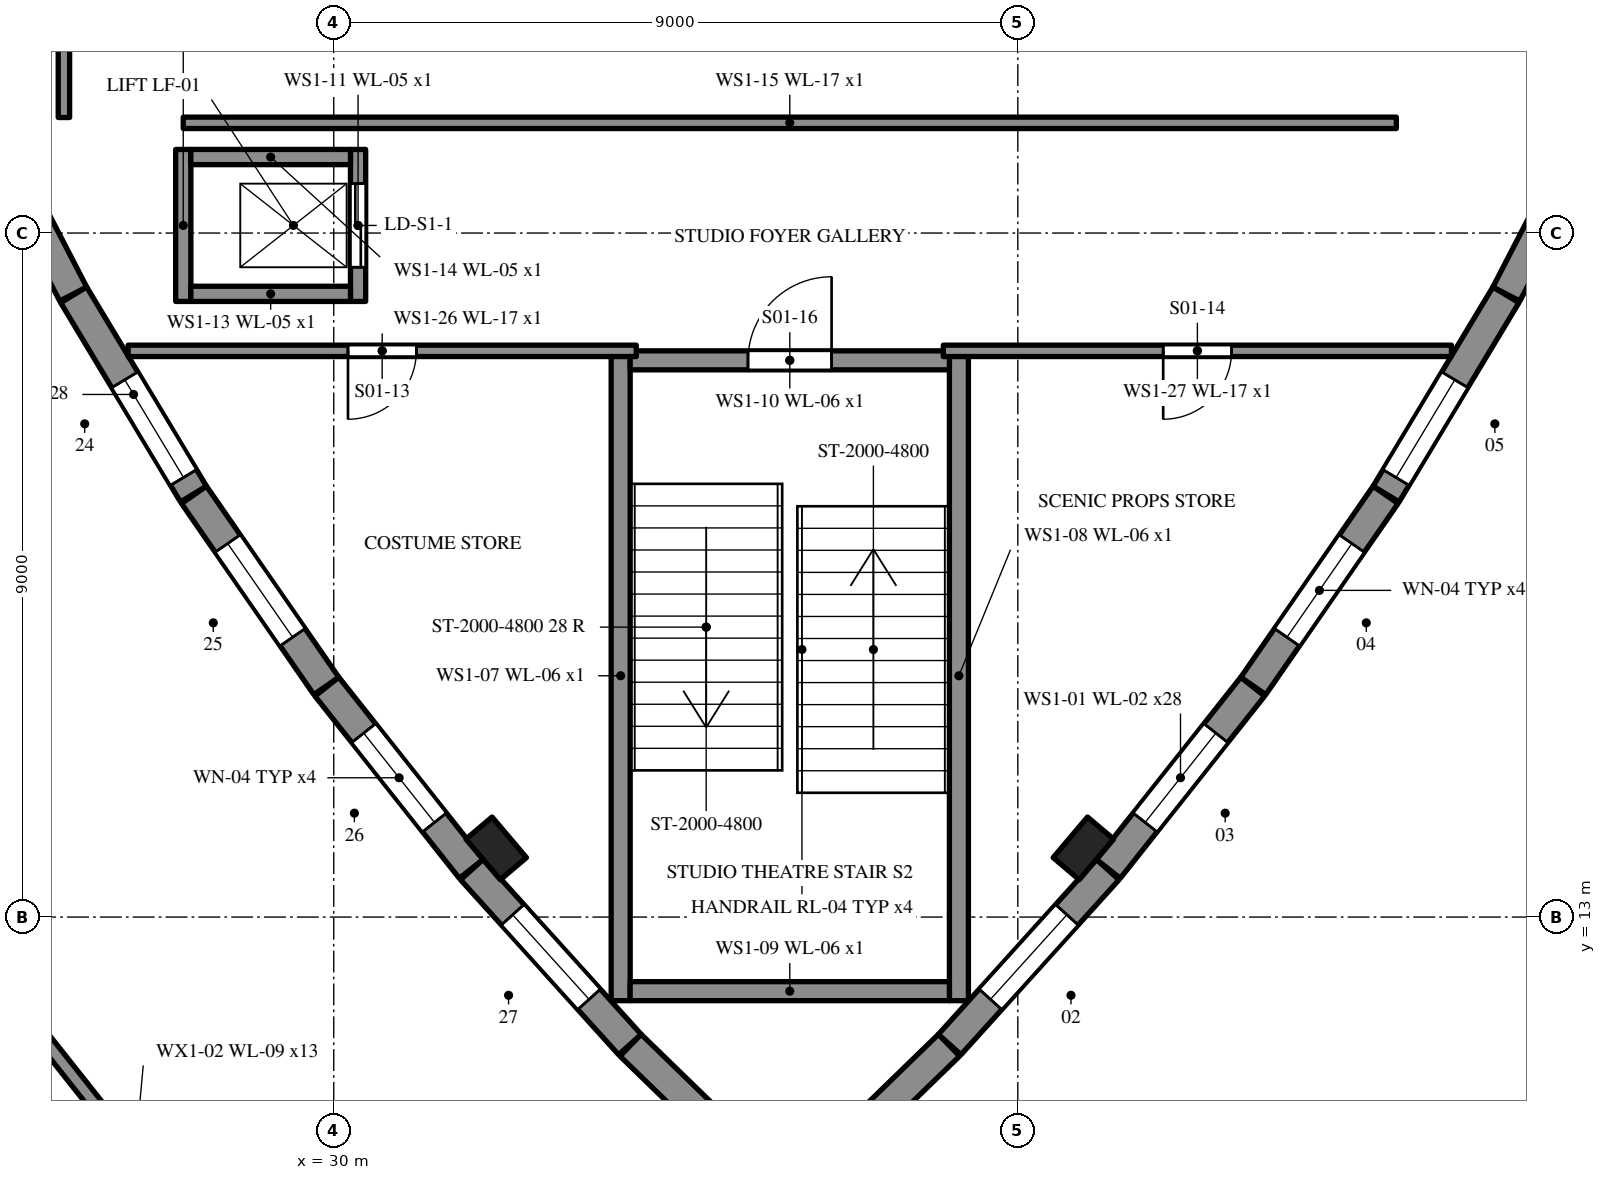
"""IFC4 building model, lengths in metres.
Left out: names, types, materials, properties, quantities, classifications, styles, units other than length and angle.
Written with IfcOpenShell. Run it as: python <this file> out.ifc"""

import sys

from ifc_helpers import new_model, si_unit, direction, frame, frame_2d, origin, origin_2d, place, context, subcontext, project, spatial, rectangle, extrude, element, fill, save


model = new_model("IFC4")
c1 = context("Model", 3, precision=1e-05, world=origin(), true_north=direction((0.0, 1.0)))
c2 = subcontext(c1, "Body", "Model", "MODEL_VIEW")
j1 = project(units=[si_unit("LENGTHUNIT", "METRE"), si_unit("PLANEANGLEUNIT", "RADIAN")], contexts=[c1])
p1 = place(None, origin())
s1 = spatial("IfcSite", under=j1, at=p1, CompositionType="ELEMENT")
p2 = place(p1, origin())
s2 = spatial("IfcBuilding", under=s1, at=p2, CompositionType="ELEMENT")
p3 = place(p2, frame((0.0, 0.0, 5.4)))
s3 = spatial("IfcBuildingStorey", under=s2, at=p3, CompositionType="ELEMENT", Elevation=5.4)
p4 = place(p3, frame((27.271, 10.022, 0.0), z_axis=(0.0, 0.0, 1.0), x_axis=(-0.62097059958, 0.783833856412, 0.0)))
e1 = element("IfcWall", 1, at=p4, inside=s3, PredefinedType="PARAPET", context=c2, shape_type="SweptSolid", body=[
    extrude(rectangle(XDim=3.083, YDim=0.18, at=frame_2d((1.542, 0.0))), origin(), (0.0, 0.0, 1.0), 0.7),
])
p5 = place(p3, frame((36.139, 9.414, 0.0), z_axis=(0.0, 0.0, 1.0), x_axis=(0.717243568607, 0.696822547922, 0.0)))
e2 = element("IfcWall", 2, at=p5, inside=s3, PredefinedType="SOLIDWALL", context=c2, shape_type="SweptSolid", body=[
    extrude(rectangle(XDim=2.726, YDim=0.4, at=frame_2d((1.363, 0.0))), origin(), (0.0, 0.0, 1.0), 4.5),
])
p6 = place(p3, frame((38.104, 11.323, 0.0), z_axis=(0.0, 0.0, 1.0), x_axis=(0.67038553216, 0.742012963681, 0.0)))
e3 = element("IfcWall", 3, at=p6, inside=s3, PredefinedType="SOLIDWALL", context=c2, shape_type="SweptSolid", body=[
    extrude(rectangle(XDim=3.102, YDim=0.4, at=frame_2d((1.551, 0.0))), origin(), (0.0, 0.0, 1.0), 4.5),
])
p7 = place(p6, frame((0.801, 0.0, 2.4)))
e4 = element("IfcOpeningElement", 4, at=p7, cuts=e3, PredefinedType="OPENING", context=c2, shape_type="SweptSolid", body=[
    extrude(rectangle(XDim=1.5, YDim=0.9, at=frame_2d((0.75, 0.45))), frame((0.0, 0.21, 0.0), z_axis=(0.0, -1.0, 0.0), x_axis=(1.0, 0.0, 0.0)), (0.0, 0.0, 1.0), 0.42),
])
p8 = place(p3, frame((40.191, 13.634, 0.0), z_axis=(0.0, 0.0, 1.0), x_axis=(0.620958553355, 0.783843399548, 0.0)))
e5 = element("IfcWall", 5, at=p8, inside=s3, PredefinedType="SOLIDWALL", context=c2, shape_type="SweptSolid", body=[
    extrude(rectangle(XDim=3.058, YDim=0.4, at=frame_2d((1.529, 0.0))), origin(), (0.0, 0.0, 1.0), 4.5),
])
p9 = place(p8, frame((0.779, 0.0, 2.4)))
e6 = element("IfcOpeningElement", 6, at=p9, cuts=e5, PredefinedType="OPENING", context=c2, shape_type="SweptSolid", body=[
    extrude(rectangle(XDim=1.5, YDim=0.9, at=frame_2d((0.75, 0.45))), frame((0.0, 0.21, 0.0), z_axis=(0.0, -1.0, 0.0), x_axis=(1.0, 0.0, 0.0)), (0.0, 0.0, 1.0), 0.42),
])
p10 = place(p3, frame((42.098, 16.042, 0.0), z_axis=(0.0, 0.0, 1.0), x_axis=(0.569371892655, 0.822080073871, 0.0)))
e7 = element("IfcWall", 7, at=p10, inside=s3, PredefinedType="SOLIDWALL", context=c2, shape_type="SweptSolid", body=[
    extrude(rectangle(XDim=3.058, YDim=0.4, at=frame_2d((1.529, 0.0))), origin(), (0.0, 0.0, 1.0), 4.5),
])
p11 = place(p10, frame((0.779, 0.0, 2.4)))
e8 = element("IfcOpeningElement", 8, at=p11, cuts=e7, PredefinedType="OPENING", context=c2, shape_type="SweptSolid", body=[
    extrude(rectangle(XDim=1.5, YDim=0.9, at=frame_2d((0.75, 0.45))), frame((0.0, 0.21, 0.0), z_axis=(0.0, -1.0, 0.0), x_axis=(1.0, 0.0, 0.0)), (0.0, 0.0, 1.0), 0.42),
])
p12 = place(p3, frame((43.846, 18.566, 0.0), z_axis=(0.0, 0.0, 1.0), x_axis=(0.515387841983, 0.856957042293, 0.0)))
e9 = element("IfcWall", 9, at=p12, inside=s3, PredefinedType="SOLIDWALL", context=c2, shape_type="SweptSolid", body=[
    extrude(rectangle(XDim=3.058, YDim=0.4, at=frame_2d((1.529, 0.0))), origin(), (0.0, 0.0, 1.0), 4.5),
])
p13 = place(p12, frame((0.254, 0.0, 2.4)))
e10 = element("IfcOpeningElement", 10, at=p13, cuts=e9, PredefinedType="OPENING", context=c2, shape_type="SweptSolid", body=[
    extrude(rectangle(XDim=1.5, YDim=0.9, at=frame_2d((0.75, 0.45))), frame((0.0, 0.21, 0.0), z_axis=(0.0, -1.0, 0.0), x_axis=(1.0, 0.0, 0.0)), (0.0, 0.0, 1.0), 0.42),
])
for number, where, z_axis, x_axis in (
    (11, (45.428, 21.198, 0.0), (0.0, 0.0, 1.0), (0.459, 0.888, 0.0)),
    (12, (25.167, 23.914, 0.0), (0.0, 0.0, 1.0), (0.459, -0.888, 0.0)),
):
    element("IfcWall", number, at=place(p3, frame(where, z_axis=z_axis, x_axis=x_axis)), inside=s3, PredefinedType="SOLIDWALL", context=c2, shape_type="SweptSolid", body=[
        extrude(rectangle(XDim=3.059, YDim=0.4, at=frame_2d((1.529, 0.0))), origin(), (0.0, 0.0, 1.0), 4.5),
    ])
p14 = place(p3, frame((26.578, 21.186, 0.0), z_axis=(0.0, 0.0, 1.0), x_axis=(0.515387841983, -0.856957042293, 0.0)))
e13 = element("IfcWall", 13, at=p14, inside=s3, PredefinedType="SOLIDWALL", context=c2, shape_type="SweptSolid", body=[
    extrude(rectangle(XDim=3.058, YDim=0.4, at=frame_2d((1.529, 0.0))), origin(), (0.0, 0.0, 1.0), 4.5),
])
p15 = place(p14, frame((1.304, 0.0, 2.4)))
e14 = element("IfcOpeningElement", 14, at=p15, cuts=e13, PredefinedType="OPENING", context=c2, shape_type="SweptSolid", body=[
    extrude(rectangle(XDim=1.5, YDim=0.9, at=frame_2d((0.75, 0.45))), frame((0.0, 0.21, 0.0), z_axis=(0.0, -1.0, 0.0), x_axis=(1.0, 0.0, 0.0)), (0.0, 0.0, 1.0), 0.42),
])
p16 = place(p3, frame((28.161, 18.555, 0.0), z_axis=(0.0, 0.0, 1.0), x_axis=(0.569371892655, -0.822080073871, 0.0)))
e15 = element("IfcWall", 15, at=p16, inside=s3, PredefinedType="SOLIDWALL", context=c2, shape_type="SweptSolid", body=[
    extrude(rectangle(XDim=3.058, YDim=0.4, at=frame_2d((1.529, 0.0))), origin(), (0.0, 0.0, 1.0), 4.5),
])
p17 = place(p16, frame((0.779, 0.0, 2.4)))
e16 = element("IfcOpeningElement", 16, at=p17, cuts=e15, PredefinedType="OPENING", context=c2, shape_type="SweptSolid", body=[
    extrude(rectangle(XDim=1.5, YDim=0.9, at=frame_2d((0.75, 0.45))), frame((0.0, 0.21, 0.0), z_axis=(0.0, -1.0, 0.0), x_axis=(1.0, 0.0, 0.0)), (0.0, 0.0, 1.0), 0.42),
])
p18 = place(p3, frame((29.91, 16.031, 0.0), z_axis=(0.0, 0.0, 1.0), x_axis=(0.620958553355, -0.783843399548, 0.0)))
e17 = element("IfcWall", 17, at=p18, inside=s3, PredefinedType="SOLIDWALL", context=c2, shape_type="SweptSolid", body=[
    extrude(rectangle(XDim=3.058, YDim=0.4, at=frame_2d((1.529, 0.0))), origin(), (0.0, 0.0, 1.0), 4.5),
])
p19 = place(p18, frame((0.779, 0.0, 2.4)))
e18 = element("IfcOpeningElement", 18, at=p19, cuts=e17, PredefinedType="OPENING", context=c2, shape_type="SweptSolid", body=[
    extrude(rectangle(XDim=1.5, YDim=0.9, at=frame_2d((0.75, 0.45))), frame((0.0, 0.21, 0.0), z_axis=(0.0, -1.0, 0.0), x_axis=(1.0, 0.0, 0.0)), (0.0, 0.0, 1.0), 0.42),
])
p20 = place(p3, frame((31.817, 13.625, 0.0), z_axis=(0.0, 0.0, 1.0), x_axis=(0.67038553216, -0.742012963681, 0.0)))
e19 = element("IfcWall", 19, at=p20, inside=s3, PredefinedType="SOLIDWALL", context=c2, shape_type="SweptSolid", body=[
    extrude(rectangle(XDim=3.102, YDim=0.4, at=frame_2d((1.551, 0.0))), origin(), (0.0, 0.0, 1.0), 4.5),
])
p21 = place(p20, frame((0.801, 0.0, 2.4)))
e20 = element("IfcOpeningElement", 20, at=p21, cuts=e19, PredefinedType="OPENING", context=c2, shape_type="SweptSolid", body=[
    extrude(rectangle(XDim=1.5, YDim=0.9, at=frame_2d((0.75, 0.45))), frame((0.0, 0.21, 0.0), z_axis=(0.0, -1.0, 0.0), x_axis=(1.0, 0.0, 0.0)), (0.0, 0.0, 1.0), 0.42),
])
p22 = place(p3, frame((33.906, 11.314, 0.0), z_axis=(0.0, 0.0, 1.0), x_axis=(0.717243568607, -0.696822547922, 0.0)))
e21 = element("IfcWall", 21, at=p22, inside=s3, PredefinedType="SOLIDWALL", context=c2, shape_type="SweptSolid", body=[
    extrude(rectangle(XDim=2.726, YDim=0.4, at=frame_2d((1.363, 0.0))), origin(), (0.0, 0.0, 1.0), 4.5),
])
for number, where, z_axis, x_axis in (
    (22, (39.863, 13.904, 0.0), (0.0, 0.0, 1.0), (0.646, 0.763, 0.0)),
    (23, (32.137, 13.904, 0.0), (0.0, 0.0, 1.0), (0.646, -0.763, 0.0)),
):
    element("IfcColumn", number, at=place(p3, frame(where, z_axis=z_axis, x_axis=x_axis)), inside=s3, PredefinedType="PILASTER", context=c2, shape_type="SweptSolid", body=[
        extrude(rectangle(XDim=0.7, YDim=0.45, at=origin_2d()), origin(), (0.0, 0.0, 1.0), 4.5),
    ])
for number, where, z_axis, x_axis in (
    (24, (33.775, 20.45, 0.0), (0.0, 0.0, 1.0), (0.0, -1.0, 0.0)),
    (25, (38.225, 11.9, 0.0), (0.0, 0.0, 1.0), (0.0, 1.0, 0.0)),
):
    element("IfcWall", number, at=place(p3, frame(where, z_axis=z_axis, x_axis=x_axis)), inside=s3, PredefinedType="SHEAR", context=c2, shape_type="SweptSolid", body=[
        extrude(rectangle(XDim=8.55, YDim=0.25, at=frame_2d((4.275, 0.0))), origin(), (0.0, 0.0, 1.0), 4.8),
    ])
p23 = place(p3, frame((38.1, 12.025, 0.0), z_axis=(0.0, 0.0, 1.0), x_axis=(-1.0, 0.0, 0.0)))
e26 = element("IfcWall", 26, at=p23, inside=s3, PredefinedType="SHEAR", context=c2, shape_type="SweptSolid", body=[
    extrude(rectangle(XDim=4.2, YDim=0.25, at=frame_2d((2.1, 0.0))), origin(), (0.0, 0.0, 1.0), 4.8),
])
p24 = place(p3, frame((33.9, 20.325, 0.0), z_axis=(0.0, 0.0, 1.0), x_axis=(1.0, 0.0, 0.0)))
e27 = element("IfcWall", 27, at=p24, inside=s3, PredefinedType="SHEAR", context=c2, shape_type="SweptSolid", body=[
    extrude(rectangle(XDim=4.2, YDim=0.25, at=frame_2d((2.1, 0.0))), origin(), (0.0, 0.0, 1.0), 4.8),
])
p25 = place(p24, frame((1.55, 0.0, 0.0)))
e28 = element("IfcOpeningElement", 28, at=p25, cuts=e27, PredefinedType="OPENING", context=c2, shape_type="SweptSolid", body=[
    extrude(rectangle(XDim=1.1, YDim=2.1, at=frame_2d((0.55, 1.05))), frame((0.0, 0.135, 0.0), z_axis=(0.0, -1.0, 0.0), x_axis=(1.0, 0.0, 0.0)), (0.0, 0.0, 1.0), 0.27),
])
p26 = place(p3, frame((30.32, 21.1, 0.0), z_axis=(0.0, 0.0, 1.0), x_axis=(0.0, 1.0, 0.0)))
e29 = element("IfcWall", 29, at=p26, inside=s3, PredefinedType="SHEAR", context=c2, shape_type="SweptSolid", body=[
    extrude(rectangle(XDim=2.0, YDim=0.2, at=frame_2d((1.0, 0.0))), origin(), (0.0, 0.0, 1.0), 4.5),
])
p27 = place(p26, frame((0.45, 0.0, 0.0)))
e30 = element("IfcOpeningElement", 30, at=p27, cuts=e29, PredefinedType="OPENING", context=c2, shape_type="SweptSolid", body=[
    extrude(rectangle(XDim=1.1, YDim=2.2, at=frame_2d((0.55, 1.1))), frame((0.0, 0.11, 0.0), z_axis=(0.0, -1.0, 0.0), x_axis=(1.0, 0.0, 0.0)), (0.0, 0.0, 1.0), 0.22),
])
p28 = place(p3, frame((28.02, 23.1, 0.0), z_axis=(0.0, 0.0, 1.0), x_axis=(0.0, -1.0, 0.0)))
e31 = element("IfcWall", 31, at=p28, inside=s3, PredefinedType="SHEAR", context=c2, shape_type="SweptSolid", body=[
    extrude(rectangle(XDim=2.0, YDim=0.2, at=frame_2d((1.0, 0.0))), origin(), (0.0, 0.0, 1.0), 4.5),
])
for number, where, z_axis, x_axis in (
    (32, (28.12, 21.2, 0.0), (0.0, 0.0, 1.0), (1.0, 0.0, 0.0)),
    (33, (30.22, 23.0, 0.0), (0.0, 0.0, 1.0), (-1.0, 0.0, 0.0)),
):
    element("IfcWall", number, at=place(p3, frame(where, z_axis=z_axis, x_axis=x_axis)), inside=s3, PredefinedType="SHEAR", context=c2, shape_type="SweptSolid", body=[
        extrude(rectangle(XDim=2.1, YDim=0.2, at=frame_2d((1.05, 0.0))), origin(), (0.0, 0.0, 1.0), 4.5),
    ])
p29 = place(p3, frame((43.98, 23.45, 0.0), z_axis=(0.0, 0.0, 1.0), x_axis=(-1.0, 0.0, 0.0)))
e34 = element("IfcWall", 34, at=p29, inside=s3, PredefinedType="PARTITIONING", context=c2, shape_type="SweptSolid", body=[
    extrude(rectangle(XDim=15.96, YDim=0.15, at=frame_2d((7.98, 0.0))), origin(), (0.0, 0.0, 1.0), 4.5),
])
p30 = place(p3, frame((26.45, 23.52, 0.0), z_axis=(0.0, 0.0, 1.0), x_axis=(0.0, 1.0, 0.0)))
e35 = element("IfcWall", 35, at=p30, inside=s3, PredefinedType="PARTITIONING", context=c2, shape_type="SweptSolid", body=[
    extrude(rectangle(XDim=12.96, YDim=0.15, at=frame_2d((6.48, 0.0))), origin(), (0.0, 0.0, 1.0), 4.5),
])
p31 = place(p30, frame((6.03, 0.0, 0.0)))
e36 = element("IfcOpeningElement", 36, at=p31, cuts=e35, PredefinedType="OPENING", context=c2, shape_type="SweptSolid", body=[
    extrude(rectangle(XDim=0.9, YDim=2.1, at=frame_2d((0.45, 1.05))), frame((0.0, 0.085, 0.0), z_axis=(0.0, -1.0, 0.0), x_axis=(1.0, 0.0, 0.0)), (0.0, 0.0, 1.0), 0.17),
])
p32 = place(p3, frame((33.98, 20.45, 0.0), z_axis=(0.0, 0.0, 1.0), x_axis=(-1.0, 0.0, 0.0)))
e37 = element("IfcWall", 37, at=p32, inside=s3, PredefinedType="PARTITIONING", context=c2, shape_type="SweptSolid", body=[
    extrude(rectangle(XDim=6.685, YDim=0.15, at=frame_2d((3.343, 0.0))), origin(), (0.0, 0.0, 1.0), 4.5),
])
p33 = place(p32, frame((2.893, 0.0, 0.0)))
e38 = element("IfcOpeningElement", 38, at=p33, cuts=e37, PredefinedType="OPENING", context=c2, shape_type="SweptSolid", body=[
    extrude(rectangle(XDim=0.9, YDim=2.1, at=frame_2d((0.45, 1.05))), frame((0.0, 0.085, 0.0), z_axis=(0.0, -1.0, 0.0), x_axis=(1.0, 0.0, 0.0)), (0.0, 0.0, 1.0), 0.17),
])
p34 = place(p3, frame((44.705, 20.45, 0.0), z_axis=(0.0, 0.0, 1.0), x_axis=(-1.0, 0.0, 0.0)))
e39 = element("IfcWall", 39, at=p34, inside=s3, PredefinedType="PARTITIONING", context=c2, shape_type="SweptSolid", body=[
    extrude(rectangle(XDim=6.685, YDim=0.15, at=frame_2d((3.343, 0.0))), origin(), (0.0, 0.0, 1.0), 4.5),
])
p35 = place(p34, frame((2.893, 0.0, 0.0)))
e40 = element("IfcOpeningElement", 40, at=p35, cuts=e39, PredefinedType="OPENING", context=c2, shape_type="SweptSolid", body=[
    extrude(rectangle(XDim=0.9, YDim=2.1, at=frame_2d((0.45, 1.05))), frame((0.0, 0.085, 0.0), z_axis=(0.0, -1.0, 0.0), x_axis=(1.0, 0.0, 0.0)), (0.0, 0.0, 1.0), 0.17),
])
p36 = place(p7, origin())
e41 = element("IfcWindow", 41, at=p36, inside=s3, PartitioningType="SINGLE_PANEL", PredefinedType="WINDOW", context=c2, shape_type="SweptSolid", body=[
    extrude(rectangle(XDim=1.5, YDim=0.9, at=frame_2d((0.75, 0.45))), frame((0.0, 0.03, 0.0), z_axis=(0.0, -1.0, 0.0), x_axis=(1.0, 0.0, 0.0)), (0.0, 0.0, 1.0), 0.06),
])
fill(e4, e41)
p37 = place(p9, origin())
e42 = element("IfcWindow", 42, at=p37, inside=s3, PartitioningType="SINGLE_PANEL", PredefinedType="WINDOW", context=c2, shape_type="SweptSolid", body=[
    extrude(rectangle(XDim=1.5, YDim=0.9, at=frame_2d((0.75, 0.45))), frame((0.0, 0.03, 0.0), z_axis=(0.0, -1.0, 0.0), x_axis=(1.0, 0.0, 0.0)), (0.0, 0.0, 1.0), 0.06),
])
fill(e6, e42)
p38 = place(p11, origin())
e43 = element("IfcWindow", 43, at=p38, inside=s3, PartitioningType="SINGLE_PANEL", PredefinedType="WINDOW", context=c2, shape_type="SweptSolid", body=[
    extrude(rectangle(XDim=1.5, YDim=0.9, at=frame_2d((0.75, 0.45))), frame((0.0, 0.03, 0.0), z_axis=(0.0, -1.0, 0.0), x_axis=(1.0, 0.0, 0.0)), (0.0, 0.0, 1.0), 0.06),
])
fill(e8, e43)
p39 = place(p13, origin())
e44 = element("IfcWindow", 44, at=p39, inside=s3, PartitioningType="SINGLE_PANEL", PredefinedType="WINDOW", context=c2, shape_type="SweptSolid", body=[
    extrude(rectangle(XDim=1.5, YDim=0.9, at=frame_2d((0.75, 0.45))), frame((0.0, 0.03, 0.0), z_axis=(0.0, -1.0, 0.0), x_axis=(1.0, 0.0, 0.0)), (0.0, 0.0, 1.0), 0.06),
])
fill(e10, e44)
p40 = place(p15, origin())
e45 = element("IfcWindow", 45, at=p40, inside=s3, PartitioningType="SINGLE_PANEL", PredefinedType="WINDOW", context=c2, shape_type="SweptSolid", body=[
    extrude(rectangle(XDim=1.5, YDim=0.9, at=frame_2d((0.75, 0.45))), frame((0.0, 0.03, 0.0), z_axis=(0.0, -1.0, 0.0), x_axis=(1.0, 0.0, 0.0)), (0.0, 0.0, 1.0), 0.06),
])
fill(e14, e45)
p41 = place(p17, origin())
e46 = element("IfcWindow", 46, at=p41, inside=s3, PartitioningType="SINGLE_PANEL", PredefinedType="WINDOW", context=c2, shape_type="SweptSolid", body=[
    extrude(rectangle(XDim=1.5, YDim=0.9, at=frame_2d((0.75, 0.45))), frame((0.0, 0.03, 0.0), z_axis=(0.0, -1.0, 0.0), x_axis=(1.0, 0.0, 0.0)), (0.0, 0.0, 1.0), 0.06),
])
fill(e16, e46)
p42 = place(p19, origin())
e47 = element("IfcWindow", 47, at=p42, inside=s3, PartitioningType="SINGLE_PANEL", PredefinedType="WINDOW", context=c2, shape_type="SweptSolid", body=[
    extrude(rectangle(XDim=1.5, YDim=0.9, at=frame_2d((0.75, 0.45))), frame((0.0, 0.03, 0.0), z_axis=(0.0, -1.0, 0.0), x_axis=(1.0, 0.0, 0.0)), (0.0, 0.0, 1.0), 0.06),
])
fill(e18, e47)
p43 = place(p21, origin())
e48 = element("IfcWindow", 48, at=p43, inside=s3, PartitioningType="SINGLE_PANEL", PredefinedType="WINDOW", context=c2, shape_type="SweptSolid", body=[
    extrude(rectangle(XDim=1.5, YDim=0.9, at=frame_2d((0.75, 0.45))), frame((0.0, 0.03, 0.0), z_axis=(0.0, -1.0, 0.0), x_axis=(1.0, 0.0, 0.0)), (0.0, 0.0, 1.0), 0.06),
])
fill(e20, e48)
p44 = place(p27, origin())
e49 = element("IfcDoor", 49, at=p44, inside=s3, OperationType="SLIDING_TO_LEFT", PredefinedType="DOOR", context=c2, shape_type="SweptSolid", body=[
    extrude(rectangle(XDim=1.1, YDim=2.2, at=frame_2d((0.55, 1.1))), frame((0.0, 0.025, 0.0), z_axis=(0.0, -1.0, 0.0), x_axis=(1.0, 0.0, 0.0)), (0.0, 0.0, 1.0), 0.05),
])
fill(e30, e49)
p45 = place(p33, origin())
e50 = element("IfcDoor", 50, at=p45, inside=s3, OperationType="SINGLE_SWING_RIGHT", PredefinedType="DOOR", context=c2, shape_type="SweptSolid", body=[
    extrude(rectangle(XDim=0.9, YDim=2.1, at=frame_2d((0.45, 1.05))), frame((0.0, 0.025, 0.0), z_axis=(0.0, -1.0, 0.0), x_axis=(1.0, 0.0, 0.0)), (0.0, 0.0, 1.0), 0.05),
])
fill(e38, e50)
p46 = place(p35, origin())
e51 = element("IfcDoor", 51, at=p46, inside=s3, OperationType="SINGLE_SWING_RIGHT", PredefinedType="DOOR", context=c2, shape_type="SweptSolid", body=[
    extrude(rectangle(XDim=0.9, YDim=2.1, at=frame_2d((0.45, 1.05))), frame((0.0, 0.025, 0.0), z_axis=(0.0, -1.0, 0.0), x_axis=(1.0, 0.0, 0.0)), (0.0, 0.0, 1.0), 0.05),
])
fill(e40, e51)
p47 = place(p25, origin())
e52 = element("IfcDoor", 52, at=p47, inside=s3, OperationType="SINGLE_SWING_RIGHT", PredefinedType="DOOR", context=c2, shape_type="SweptSolid", body=[
    extrude(rectangle(XDim=1.1, YDim=2.1, at=frame_2d((0.55, 1.05))), frame((0.0, 0.025, 0.0), z_axis=(0.0, -1.0, 0.0), x_axis=(1.0, 0.0, 0.0)), (0.0, 0.0, 1.0), 0.05),
])
fill(e28, e52)
save(model, sys.argv[1])
